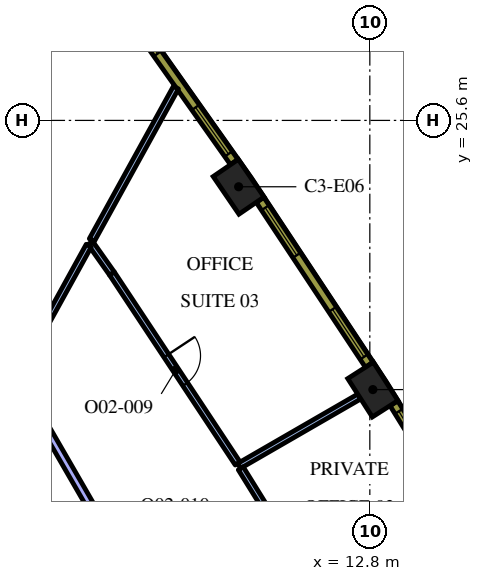
"""IFC4 building model, lengths in metres.
Left out: names, types, materials, properties, quantities, classifications, styles, units other than length and angle.
Written with IfcOpenShell. Run it as: python <this file> out.ifc"""

import sys

from ifc_helpers import new_model, si_unit, direction, frame, frame_2d, origin, origin_2d, place, context, subcontext, project, spatial, rectangle, extrude, element, fill, save


model = new_model("IFC4")
c1 = context("Model", 3, precision=1e-05, world=origin(), true_north=direction((0.0, 1.0)))
c2 = subcontext(c1, "Body", "Model", "MODEL_VIEW")
j1 = project(units=[si_unit("LENGTHUNIT", "METRE"), si_unit("PLANEANGLEUNIT", "RADIAN")], contexts=[c1])
p1 = place(None, origin())
s1 = spatial("IfcSite", under=j1, at=p1, CompositionType="ELEMENT")
p2 = place(p1, origin())
s2 = spatial("IfcBuilding", under=s1, at=p2, CompositionType="ELEMENT")
p3 = place(p2, frame((0.0, 0.0, 158.4)))
s3 = spatial("IfcBuildingStorey", under=s2, at=p3, CompositionType="ELEMENT", Elevation=158.4)
for number, where, z_axis, x_axis in (
    (1, (12.88, 18.517, 0.0), (0.0, 0.0, 1.0), (-0.539, 0.842, 0.0)),
    (2, (9.348, 23.854, 0.0), (0.0, 0.0, 1.0), (-0.565, 0.825, 0.0)),
):
    element("IfcColumn", number, at=place(p3, frame(where, z_axis=z_axis, x_axis=x_axis)), inside=s3, PredefinedType="COLUMN", context=c2, shape_type="SweptSolid", body=[
        extrude(rectangle(XDim=1.2, YDim=0.8, at=origin_2d()), origin(), (0.0, 0.0, 1.0), 4.2),
    ])
p4 = place(p3, frame((8.279, 5.761, 0.0), z_axis=(0.0, 0.0, 1.0), x_axis=(-0.500010359015, 0.866019422922, 0.0)))
e3 = element("IfcWall", 3, at=p4, inside=s3, PredefinedType="SOLIDWALL", context=c2, shape_type="SweptSolid", body=[
    extrude(rectangle(XDim=12.528, YDim=0.8, at=frame_2d((6.264, 0.0))), origin(), (0.0, 0.0, 1.0), 4.2),
])
p5 = place(p3, frame((9.363, 16.511, 0.0), z_axis=(0.0, 0.0, 1.0), x_axis=(0.866006134298, 0.500033374244, 0.0)))
e4 = element("IfcWall", 4, at=p5, inside=s3, PredefinedType="PARTITIONING", context=c2, shape_type="SweptSolid", body=[
    extrude(rectangle(XDim=3.648, YDim=0.15, at=frame_2d((1.824, 0.0))), origin(), (0.0, 0.0, 1.0), 3.15),
])
p6 = place(p3, frame((9.403, 16.447, 0.0), z_axis=(0.0, 0.0, 1.0), x_axis=(0.527026092571, -0.849849102929, 0.0)))
e5 = element("IfcWall", 5, at=p6, inside=s3, PredefinedType="PARTITIONING", context=c2, shape_type="SweptSolid", body=[
    extrude(rectangle(XDim=6.407, YDim=0.15, at=frame_2d((3.204, 0.0))), origin(), (0.0, 0.0, 1.0), 3.15),
])
p7 = place(p6, frame((2.707, 0.0, 0.0)))
e6 = element("IfcOpeningElement", 6, at=p7, cuts=e5, PredefinedType="OPENING", context=c2, shape_type="SweptSolid", body=[
    extrude(rectangle(XDim=0.9, YDim=2.1, at=frame_2d((0.45, 1.05))), frame((0.0, 0.085, 0.0), z_axis=(0.0, -1.0, 0.0), x_axis=(1.0, 0.0, 0.0)), (0.0, 0.0, 1.0), 0.17),
])
p8 = place(p3, frame((6.013, 21.573, 0.0), z_axis=(0.0, 0.0, 1.0), x_axis=(0.551906048292, -0.833906298009, 0.0)))
e7 = element("IfcWall", 7, at=p8, inside=s3, PredefinedType="PARTITIONING", context=c2, shape_type="SweptSolid", body=[
    extrude(rectangle(XDim=5.995, YDim=0.15, at=frame_2d((2.998, 0.0))), origin(), (0.0, 0.0, 1.0), 3.15),
])
p9 = place(p8, frame((2.595, 0.0, 0.0)))
e8 = element("IfcOpeningElement", 8, at=p9, cuts=e7, PredefinedType="OPENING", context=c2, shape_type="SweptSolid", body=[
    extrude(rectangle(XDim=0.9, YDim=2.1, at=frame_2d((0.45, 1.05))), frame((0.0, 0.085, 0.0), z_axis=(0.0, -1.0, 0.0), x_axis=(1.0, 0.0, 0.0)), (0.0, 0.0, 1.0), 0.17),
])
p10 = place(p3, frame((6.013, 21.573, 0.0), z_axis=(0.0, 0.0, 1.0), x_axis=(-0.576965221715, 0.816768714467, 0.0)))
e9 = element("IfcWall", 9, at=p10, inside=s3, PredefinedType="PARTITIONING", context=c2, shape_type="SweptSolid", body=[
    extrude(rectangle(XDim=0.986, YDim=0.15, at=frame_2d((0.493, 0.0))), origin(), (0.0, 0.0, 1.0), 3.15),
])
p11 = place(p3, frame((5.484, 22.451, 0.0), z_axis=(0.0, 0.0, 1.0), x_axis=(0.483018213307, 0.875610304652, 0.0)))
e10 = element("IfcWall", 10, at=p11, inside=s3, PredefinedType="PARTITIONING", context=c2, shape_type="SweptSolid", body=[
    extrude(rectangle(XDim=4.584, YDim=0.15, at=frame_2d((2.292, 0.0))), origin(), (0.0, 0.0, 1.0), 3.15),
])
p12 = place(p3, frame((3.47, 18.8, 0.0), z_axis=(0.0, 0.0, 1.0), x_axis=(0.483004783308, 0.87561771299, 0.0)))
e11 = element("IfcWall", 11, at=p12, inside=s3, PredefinedType="PARTITIONING", context=c2, shape_type="SweptSolid", body=[
    extrude(rectangle(XDim=4.003, YDim=0.15, at=frame_2d((2.001, 0.0))), origin(), (0.0, 0.0, 1.0), 3.15),
])
p13 = place(p3, frame((8.515, 10.152, 0.0), z_axis=(0.0, 0.0, 1.0), x_axis=(-0.499998974385, 0.866025995923, 0.0)))
e12 = element("IfcWall", 12, at=p13, inside=s3, PredefinedType="PARTITIONING", context=c2, shape_type="SweptSolid", body=[
    extrude(rectangle(XDim=9.986, YDim=0.2, at=frame_2d((4.993, 0.0))), origin(), (0.0, 0.0, 1.0), 3.15),
])
p14 = place(p13, frame((4.5, 0.0, 0.0)))
e13 = element("IfcOpeningElement", 13, at=p14, cuts=e12, PredefinedType="OPENING", context=c2, shape_type="SweptSolid", body=[
    extrude(rectangle(XDim=1.0, YDim=2.1, at=frame_2d((0.5, 1.05))), frame((0.0, 0.11, 0.0), z_axis=(0.0, -1.0, 0.0), x_axis=(1.0, 0.0, 0.0)), (0.0, 0.0, 1.0), 0.22),
])
p15 = place(p3, frame((16.171, 13.731, 0.0), z_axis=(0.0, 0.0, 1.0), x_axis=(-0.526197926587, 0.850362124072, 0.0)))
e14 = element("IfcWall", 14, at=p15, inside=s3, PredefinedType="SOLIDWALL", context=c2, shape_type="SweptSolid", body=[
    extrude(rectangle(XDim=5.203, YDim=0.24, at=frame_2d((2.602, 0.0))), origin(), (0.0, 0.0, 1.0), 3.95),
])
p16 = place(p15, frame((0.248, 0.0, 0.9)))
e15 = element("IfcOpeningElement", 15, at=p16, cuts=e14, PredefinedType="OPENING", context=c2, shape_type="SweptSolid", body=[
    extrude(rectangle(XDim=1.5, YDim=2.55, at=frame_2d((0.75, 1.275))), frame((0.0, 0.13, 0.0), z_axis=(0.0, -1.0, 0.0), x_axis=(1.0, 0.0, 0.0)), (0.0, 0.0, 1.0), 0.26),
])
p17 = place(p15, frame((3.455, 0.0, 0.9)))
e16 = element("IfcOpeningElement", 16, at=p17, cuts=e14, PredefinedType="OPENING", context=c2, shape_type="SweptSolid", body=[
    extrude(rectangle(XDim=1.5, YDim=2.55, at=frame_2d((0.75, 1.275))), frame((0.0, 0.13, 0.0), z_axis=(0.0, -1.0, 0.0), x_axis=(1.0, 0.0, 0.0)), (0.0, 0.0, 1.0), 0.26),
])
p18 = place(p3, frame((12.783, 19.171, 0.0), z_axis=(0.0, 0.0, 1.0), x_axis=(-0.551892811511, 0.833915058386, 0.0)))
e17 = element("IfcWall", 17, at=p18, inside=s3, PredefinedType="SOLIDWALL", context=c2, shape_type="SweptSolid", body=[
    extrude(rectangle(XDim=5.204, YDim=0.24, at=frame_2d((2.602, 0.0))), origin(), (0.0, 0.0, 1.0), 3.95),
])
p19 = place(p18, frame((0.248, 0.0, 0.9)))
e18 = element("IfcOpeningElement", 18, at=p19, cuts=e17, PredefinedType="OPENING", context=c2, shape_type="SweptSolid", body=[
    extrude(rectangle(XDim=1.5, YDim=2.55, at=frame_2d((0.75, 1.275))), frame((0.0, 0.13, 0.0), z_axis=(0.0, -1.0, 0.0), x_axis=(1.0, 0.0, 0.0)), (0.0, 0.0, 1.0), 0.26),
])
p20 = place(p18, frame((3.455, 0.0, 0.9)))
e19 = element("IfcOpeningElement", 19, at=p20, cuts=e17, PredefinedType="OPENING", context=c2, shape_type="SweptSolid", body=[
    extrude(rectangle(XDim=1.5, YDim=2.55, at=frame_2d((0.75, 1.275))), frame((0.0, 0.13, 0.0), z_axis=(0.0, -1.0, 0.0), x_axis=(1.0, 0.0, 0.0)), (0.0, 0.0, 1.0), 0.26),
])
p21 = place(p3, frame((9.231, 24.504, 0.0), z_axis=(0.0, 0.0, 1.0), x_axis=(-0.577115207679, 0.816662743772, 0.0)))
e20 = element("IfcWall", 20, at=p21, inside=s3, PredefinedType="SOLIDWALL", context=c2, shape_type="SweptSolid", body=[
    extrude(rectangle(XDim=5.213, YDim=0.24, at=frame_2d((2.606, 0.0))), origin(), (0.0, 0.0, 1.0), 3.95),
])
p22 = place(p21, frame((0.261, 0.0, 0.9)))
e21 = element("IfcOpeningElement", 21, at=p22, cuts=e20, PredefinedType="OPENING", context=c2, shape_type="SweptSolid", body=[
    extrude(rectangle(XDim=1.5, YDim=2.55, at=frame_2d((0.75, 1.275))), frame((0.0, 0.13, 0.0), z_axis=(0.0, -1.0, 0.0), x_axis=(1.0, 0.0, 0.0)), (0.0, 0.0, 1.0), 0.26),
])
p23 = place(p21, frame((3.492, 0.0, 0.9)))
e22 = element("IfcOpeningElement", 22, at=p23, cuts=e20, PredefinedType="OPENING", context=c2, shape_type="SweptSolid", body=[
    extrude(rectangle(XDim=1.5, YDim=2.55, at=frame_2d((0.75, 1.275))), frame((0.0, 0.13, 0.0), z_axis=(0.0, -1.0, 0.0), x_axis=(1.0, 0.0, 0.0)), (0.0, 0.0, 1.0), 0.26),
])
p24 = place(p9, origin())
e23 = element("IfcDoor", 23, at=p24, inside=s3, OperationType="SINGLE_SWING_RIGHT", PredefinedType="DOOR", context=c2, shape_type="SweptSolid", body=[
    extrude(rectangle(XDim=0.9, YDim=2.1, at=frame_2d((0.45, 1.05))), frame((0.0, 0.025, 0.0), z_axis=(0.0, -1.0, 0.0), x_axis=(1.0, 0.0, 0.0)), (0.0, 0.0, 1.0), 0.05),
])
fill(e8, e23)
p25 = place(p17, origin())
e24 = element("IfcWindow", 24, at=p25, inside=s3, PartitioningType="SINGLE_PANEL", PredefinedType="WINDOW", context=c2, shape_type="SweptSolid", body=[
    extrude(rectangle(XDim=1.5, YDim=2.55, at=frame_2d((0.75, 1.275))), frame((0.0, 0.04, 0.0), z_axis=(0.0, -1.0, 0.0), x_axis=(1.0, 0.0, 0.0)), (0.0, 0.0, 1.0), 0.06),
])
fill(e16, e24)
p26 = place(p19, origin())
e25 = element("IfcWindow", 25, at=p26, inside=s3, PartitioningType="SINGLE_PANEL", PredefinedType="WINDOW", context=c2, shape_type="SweptSolid", body=[
    extrude(rectangle(XDim=1.5, YDim=2.55, at=frame_2d((0.75, 1.275))), frame((0.0, 0.04, 0.0), z_axis=(0.0, -1.0, 0.0), x_axis=(1.0, 0.0, 0.0)), (0.0, 0.0, 1.0), 0.06),
])
fill(e18, e25)
p27 = place(p20, origin())
e26 = element("IfcWindow", 26, at=p27, inside=s3, PartitioningType="SINGLE_PANEL", PredefinedType="WINDOW", context=c2, shape_type="SweptSolid", body=[
    extrude(rectangle(XDim=1.5, YDim=2.55, at=frame_2d((0.75, 1.275))), frame((0.0, 0.04, 0.0), z_axis=(0.0, -1.0, 0.0), x_axis=(1.0, 0.0, 0.0)), (0.0, 0.0, 1.0), 0.06),
])
fill(e19, e26)
p28 = place(p22, origin())
e27 = element("IfcWindow", 27, at=p28, inside=s3, PartitioningType="SINGLE_PANEL", PredefinedType="WINDOW", context=c2, shape_type="SweptSolid", body=[
    extrude(rectangle(XDim=1.5, YDim=2.55, at=frame_2d((0.75, 1.275))), frame((0.0, 0.04, 0.0), z_axis=(0.0, -1.0, 0.0), x_axis=(1.0, 0.0, 0.0)), (0.0, 0.0, 1.0), 0.06),
])
fill(e21, e27)
p29 = place(p23, origin())
e28 = element("IfcWindow", 28, at=p29, inside=s3, PartitioningType="SINGLE_PANEL", PredefinedType="WINDOW", context=c2, shape_type="SweptSolid", body=[
    extrude(rectangle(XDim=1.5, YDim=2.55, at=frame_2d((0.75, 1.275))), frame((0.0, 0.04, 0.0), z_axis=(0.0, -1.0, 0.0), x_axis=(1.0, 0.0, 0.0)), (0.0, 0.0, 1.0), 0.06),
])
fill(e22, e28)
save(model, sys.argv[1])
